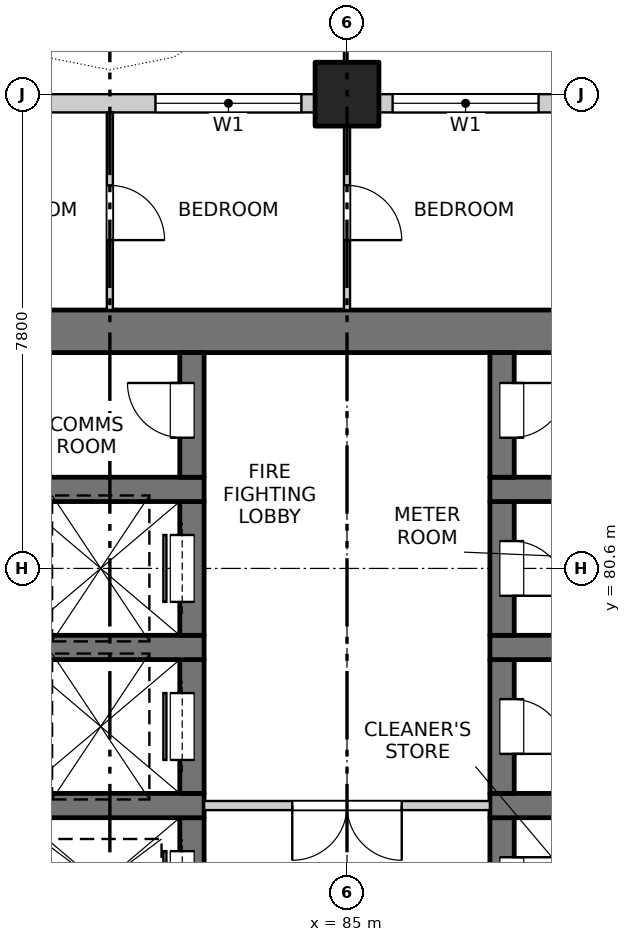
"""IFC4 building model, lengths in metres.
Left out: names, types, materials, properties, quantities, classifications, styles, units other than length and angle.
Written with IfcOpenShell. Run it as: python <this file> out.ifc"""

import sys

from ifc_helpers import new_model, si_unit, direction, frame, frame_2d, origin, origin_2d, place, context, subcontext, project, spatial, rectangle, extrude, element, fill, save


model = new_model("IFC4")
c1 = context("Model", 3, precision=1e-05, world=origin(), true_north=direction((0.0, 1.0)))
c2 = subcontext(c1, "Body", "Model", "MODEL_VIEW")
j1 = project(units=[si_unit("LENGTHUNIT", "METRE"), si_unit("PLANEANGLEUNIT", "RADIAN")], contexts=[c1])
p1 = place(None, origin())
s1 = spatial("IfcSite", under=j1, at=p1, CompositionType="ELEMENT")
p2 = place(p1, origin())
s2 = spatial("IfcBuilding", under=s1, at=p2, CompositionType="ELEMENT")
p3 = place(p2, frame((0.0, 0.0, 26.3)))
s3 = spatial("IfcBuildingStorey", under=s2, at=p3, CompositionType="ELEMENT", Elevation=26.3)
p4 = place(p3, frame((85.0, 88.4, -0.25), z_axis=(0.0, 0.0, 1.0), x_axis=(1.0, 0.0, 0.0)))
e1 = element("IfcColumn", 1, at=p4, inside=s3, PredefinedType="COLUMN", context=c2, shape_type="SweptSolid", body=[
    extrude(rectangle(XDim=1.05, YDim=1.05, at=origin_2d()), origin(), (0.0, 0.0, 1.0), 3.4),
])
p5 = place(p3, frame((75.6, 84.5, -0.25), z_axis=(0.0, 0.0, 1.0), x_axis=(1.0, 0.0, 0.0)))
e2 = element("IfcWall", 2, at=p5, inside=s3, PredefinedType="SOLIDWALL", context=c2, shape_type="SweptSolid", body=[
    extrude(rectangle(XDim=18.8, YDim=0.7, at=frame_2d((9.4, 0.0))), origin(), (0.0, 0.0, 1.0), 3.4),
])
p6 = place(p3, frame((82.45, 74.3, -0.25), z_axis=(0.0, 0.0, 1.0), x_axis=(0.0, 1.0, 0.0)))
e3 = element("IfcWall", 3, at=p6, inside=s3, PredefinedType="SOLIDWALL", context=c2, shape_type="SweptSolid", body=[
    extrude(rectangle(XDim=2.2, YDim=0.4, at=frame_2d((1.1, 0.0))), origin(), (0.0, 0.0, 1.0), 3.4),
])
p7 = place(p6, frame((0.55, 0.0, 0.25)))
e4 = element("IfcOpeningElement", 4, at=p7, cuts=e3, PredefinedType="OPENING", context=c2, shape_type="SweptSolid", body=[
    extrude(rectangle(XDim=1.1, YDim=2.1, at=frame_2d((0.55, 1.05))), frame((0.0, 0.21, 0.0), z_axis=(0.0, -1.0, 0.0), x_axis=(1.0, 0.0, 0.0)), (0.0, 0.0, 1.0), 0.42),
])
p8 = place(p3, frame((79.65, 76.7, -0.25), z_axis=(0.0, 0.0, 1.0), x_axis=(1.0, 0.0, 0.0)))
e5 = element("IfcWall", 5, at=p8, inside=s3, PredefinedType="SOLIDWALL", context=c2, shape_type="SweptSolid", body=[
    extrude(rectangle(XDim=3.0, YDim=0.4, at=frame_2d((1.5, 0.0))), origin(), (0.0, 0.0, 1.0), 3.4),
])
p9 = place(p3, frame((82.45, 76.9, -0.25), z_axis=(0.0, 0.0, 1.0), x_axis=(0.0, 1.0, 0.0)))
e6 = element("IfcWall", 6, at=p9, inside=s3, PredefinedType="SOLIDWALL", context=c2, shape_type="SweptSolid", body=[
    extrude(rectangle(XDim=2.2, YDim=0.4, at=frame_2d((1.1, 0.0))), origin(), (0.0, 0.0, 1.0), 3.4),
])
p10 = place(p9, frame((0.55, 0.0, 0.25)))
e7 = element("IfcOpeningElement", 7, at=p10, cuts=e6, PredefinedType="OPENING", context=c2, shape_type="SweptSolid", body=[
    extrude(rectangle(XDim=1.1, YDim=2.1, at=frame_2d((0.55, 1.05))), frame((0.0, 0.21, 0.0), z_axis=(0.0, -1.0, 0.0), x_axis=(1.0, 0.0, 0.0)), (0.0, 0.0, 1.0), 0.42),
])
p11 = place(p3, frame((79.65, 79.3, -0.25), z_axis=(0.0, 0.0, 1.0), x_axis=(1.0, 0.0, 0.0)))
e8 = element("IfcWall", 8, at=p11, inside=s3, PredefinedType="SOLIDWALL", context=c2, shape_type="SweptSolid", body=[
    extrude(rectangle(XDim=3.0, YDim=0.4, at=frame_2d((1.5, 0.0))), origin(), (0.0, 0.0, 1.0), 3.4),
])
p12 = place(p3, frame((82.45, 79.5, -0.25), z_axis=(0.0, 0.0, 1.0), x_axis=(0.0, 1.0, 0.0)))
e9 = element("IfcWall", 9, at=p12, inside=s3, PredefinedType="SOLIDWALL", context=c2, shape_type="SweptSolid", body=[
    extrude(rectangle(XDim=2.2, YDim=0.4, at=frame_2d((1.1, 0.0))), origin(), (0.0, 0.0, 1.0), 3.4),
])
p13 = place(p12, frame((0.55, 0.0, 0.25)))
e10 = element("IfcOpeningElement", 10, at=p13, cuts=e9, PredefinedType="OPENING", context=c2, shape_type="SweptSolid", body=[
    extrude(rectangle(XDim=1.1, YDim=2.1, at=frame_2d((0.55, 1.05))), frame((0.0, 0.21, 0.0), z_axis=(0.0, -1.0, 0.0), x_axis=(1.0, 0.0, 0.0)), (0.0, 0.0, 1.0), 0.42),
])
p14 = place(p3, frame((79.65, 81.9, -0.25), z_axis=(0.0, 0.0, 1.0), x_axis=(1.0, 0.0, 0.0)))
e11 = element("IfcWall", 11, at=p14, inside=s3, PredefinedType="SOLIDWALL", context=c2, shape_type="SweptSolid", body=[
    extrude(rectangle(XDim=3.0, YDim=0.4, at=frame_2d((1.5, 0.0))), origin(), (0.0, 0.0, 1.0), 3.4),
])
p15 = place(p3, frame((82.45, 82.1, -0.25), z_axis=(0.0, 0.0, 1.0), x_axis=(0.0, 1.0, 0.0)))
e12 = element("IfcWall", 12, at=p15, inside=s3, PredefinedType="SOLIDWALL", context=c2, shape_type="SweptSolid", body=[
    extrude(rectangle(XDim=2.05, YDim=0.4, at=frame_2d((1.025, 0.0))), origin(), (0.0, 0.0, 1.0), 3.4),
])
p16 = place(p15, frame((0.65, 0.0, 0.25)))
e13 = element("IfcOpeningElement", 13, at=p16, cuts=e12, PredefinedType="OPENING", context=c2, shape_type="SweptSolid", body=[
    extrude(rectangle(XDim=0.9, YDim=2.1, at=frame_2d((0.45, 1.05))), frame((0.0, 0.21, 0.0), z_axis=(0.0, -1.0, 0.0), x_axis=(1.0, 0.0, 0.0)), (0.0, 0.0, 1.0), 0.42),
])
p17 = place(p3, frame((87.55, 74.3, -0.25), z_axis=(0.0, 0.0, 1.0), x_axis=(0.0, 1.0, 0.0)))
e14 = element("IfcWall", 14, at=p17, inside=s3, PredefinedType="SOLIDWALL", context=c2, shape_type="SweptSolid", body=[
    extrude(rectangle(XDim=2.2, YDim=0.4, at=frame_2d((1.1, 0.0))), origin(), (0.0, 0.0, 1.0), 3.4),
])
p18 = place(p17, frame((0.65, 0.0, 0.25)))
e15 = element("IfcOpeningElement", 15, at=p18, cuts=e14, PredefinedType="OPENING", context=c2, shape_type="SweptSolid", body=[
    extrude(rectangle(XDim=0.9, YDim=2.1, at=frame_2d((0.45, 1.05))), frame((0.0, 0.21, 0.0), z_axis=(0.0, -1.0, 0.0), x_axis=(1.0, 0.0, 0.0)), (0.0, 0.0, 1.0), 0.42),
])
p19 = place(p3, frame((87.35, 76.7, -0.25), z_axis=(0.0, 0.0, 1.0), x_axis=(1.0, 0.0, 0.0)))
e16 = element("IfcWall", 16, at=p19, inside=s3, PredefinedType="SOLIDWALL", context=c2, shape_type="SweptSolid", body=[
    extrude(rectangle(XDim=3.0, YDim=0.4, at=frame_2d((1.5, 0.0))), origin(), (0.0, 0.0, 1.0), 3.4),
])
p20 = place(p3, frame((87.55, 76.9, -0.25), z_axis=(0.0, 0.0, 1.0), x_axis=(0.0, 1.0, 0.0)))
e17 = element("IfcWall", 17, at=p20, inside=s3, PredefinedType="SOLIDWALL", context=c2, shape_type="SweptSolid", body=[
    extrude(rectangle(XDim=2.2, YDim=0.4, at=frame_2d((1.1, 0.0))), origin(), (0.0, 0.0, 1.0), 3.4),
])
p21 = place(p20, frame((0.65, 0.0, 0.25)))
e18 = element("IfcOpeningElement", 18, at=p21, cuts=e17, PredefinedType="OPENING", context=c2, shape_type="SweptSolid", body=[
    extrude(rectangle(XDim=0.9, YDim=2.1, at=frame_2d((0.45, 1.05))), frame((0.0, 0.21, 0.0), z_axis=(0.0, -1.0, 0.0), x_axis=(1.0, 0.0, 0.0)), (0.0, 0.0, 1.0), 0.42),
])
p22 = place(p3, frame((87.35, 79.3, -0.25), z_axis=(0.0, 0.0, 1.0), x_axis=(1.0, 0.0, 0.0)))
e19 = element("IfcWall", 19, at=p22, inside=s3, PredefinedType="SOLIDWALL", context=c2, shape_type="SweptSolid", body=[
    extrude(rectangle(XDim=3.0, YDim=0.4, at=frame_2d((1.5, 0.0))), origin(), (0.0, 0.0, 1.0), 3.4),
])
p23 = place(p3, frame((87.55, 79.5, -0.25), z_axis=(0.0, 0.0, 1.0), x_axis=(0.0, 1.0, 0.0)))
e20 = element("IfcWall", 20, at=p23, inside=s3, PredefinedType="SOLIDWALL", context=c2, shape_type="SweptSolid", body=[
    extrude(rectangle(XDim=2.2, YDim=0.4, at=frame_2d((1.1, 0.0))), origin(), (0.0, 0.0, 1.0), 3.4),
])
p24 = place(p23, frame((0.65, 0.0, 0.25)))
e21 = element("IfcOpeningElement", 21, at=p24, cuts=e20, PredefinedType="OPENING", context=c2, shape_type="SweptSolid", body=[
    extrude(rectangle(XDim=0.9, YDim=2.1, at=frame_2d((0.45, 1.05))), frame((0.0, 0.21, 0.0), z_axis=(0.0, -1.0, 0.0), x_axis=(1.0, 0.0, 0.0)), (0.0, 0.0, 1.0), 0.42),
])
p25 = place(p3, frame((87.35, 81.9, -0.25), z_axis=(0.0, 0.0, 1.0), x_axis=(1.0, 0.0, 0.0)))
e22 = element("IfcWall", 22, at=p25, inside=s3, PredefinedType="SOLIDWALL", context=c2, shape_type="SweptSolid", body=[
    extrude(rectangle(XDim=3.0, YDim=0.4, at=frame_2d((1.5, 0.0))), origin(), (0.0, 0.0, 1.0), 3.4),
])
p26 = place(p3, frame((87.55, 82.1, -0.25), z_axis=(0.0, 0.0, 1.0), x_axis=(0.0, 1.0, 0.0)))
e23 = element("IfcWall", 23, at=p26, inside=s3, PredefinedType="SOLIDWALL", context=c2, shape_type="SweptSolid", body=[
    extrude(rectangle(XDim=2.05, YDim=0.4, at=frame_2d((1.025, 0.0))), origin(), (0.0, 0.0, 1.0), 3.4),
])
p27 = place(p26, frame((0.65, 0.0, 0.25)))
e24 = element("IfcOpeningElement", 24, at=p27, cuts=e23, PredefinedType="OPENING", context=c2, shape_type="SweptSolid", body=[
    extrude(rectangle(XDim=0.9, YDim=2.1, at=frame_2d((0.45, 1.05))), frame((0.0, 0.21, 0.0), z_axis=(0.0, -1.0, 0.0), x_axis=(1.0, 0.0, 0.0)), (0.0, 0.0, 1.0), 0.42),
])
p28 = place(p3, frame((77.725, 88.25, 0.0), z_axis=(0.0, 0.0, 1.0), x_axis=(1.0, 0.0, 0.0)))
e25 = element("IfcWall", 25, at=p28, inside=s3, PredefinedType="SOLIDWALL", context=c2, shape_type="SweptSolid", body=[
    extrude(rectangle(XDim=6.75, YDim=0.3, at=frame_2d((3.375, 0.0))), origin(), (0.0, 0.0, 1.0), 2.7),
])
p29 = place(p28, frame((0.525, 0.0, 0.0)))
e26 = element("IfcOpeningElement", 26, at=p29, cuts=e25, PredefinedType="OPENING", context=c2, shape_type="SweptSolid", body=[
    extrude(rectangle(XDim=1.8, YDim=2.4, at=frame_2d((0.9, 1.2))), frame((0.0, 0.16, 0.0), z_axis=(0.0, -1.0, 0.0), x_axis=(1.0, 0.0, 0.0)), (0.0, 0.0, 1.0), 0.32),
])
p30 = place(p28, frame((4.125, 0.0, 0.9)))
e27 = element("IfcOpeningElement", 27, at=p30, cuts=e25, PredefinedType="OPENING", context=c2, shape_type="SweptSolid", body=[
    extrude(rectangle(XDim=2.4, YDim=1.8, at=frame_2d((1.2, 0.9))), frame((0.0, 0.16, 0.0), z_axis=(0.0, -1.0, 0.0), x_axis=(1.0, 0.0, 0.0)), (0.0, 0.0, 1.0), 0.32),
])
p31 = place(p3, frame((85.525, 88.25, 0.0), z_axis=(0.0, 0.0, 1.0), x_axis=(1.0, 0.0, 0.0)))
e28 = element("IfcWall", 28, at=p31, inside=s3, PredefinedType="SOLIDWALL", context=c2, shape_type="SweptSolid", body=[
    extrude(rectangle(XDim=6.75, YDim=0.3, at=frame_2d((3.375, 0.0))), origin(), (0.0, 0.0, 1.0), 2.7),
])
p32 = place(p31, frame((0.225, 0.0, 0.9)))
e29 = element("IfcOpeningElement", 29, at=p32, cuts=e28, PredefinedType="OPENING", context=c2, shape_type="SweptSolid", body=[
    extrude(rectangle(XDim=2.4, YDim=1.8, at=frame_2d((1.2, 0.9))), frame((0.0, 0.16, 0.0), z_axis=(0.0, -1.0, 0.0), x_axis=(1.0, 0.0, 0.0)), (0.0, 0.0, 1.0), 0.32),
])
p33 = place(p31, frame((4.125, 0.0, 0.9)))
e30 = element("IfcOpeningElement", 30, at=p33, cuts=e28, PredefinedType="OPENING", context=c2, shape_type="SweptSolid", body=[
    extrude(rectangle(XDim=2.4, YDim=1.8, at=frame_2d((1.2, 0.9))), frame((0.0, 0.16, 0.0), z_axis=(0.0, -1.0, 0.0), x_axis=(1.0, 0.0, 0.0)), (0.0, 0.0, 1.0), 0.32),
])
p34 = place(p3, frame((82.65, 76.7, 0.0), z_axis=(0.0, 0.0, 1.0), x_axis=(1.0, 0.0, 0.0)))
e31 = element("IfcWall", 31, at=p34, inside=s3, PredefinedType="PARTITIONING", context=c2, shape_type="SweptSolid", body=[
    extrude(rectangle(XDim=4.7, YDim=0.15, at=frame_2d((2.35, 0.0))), origin(), (0.0, 0.0, 1.0), 3.15),
])
p35 = place(p34, frame((1.45, 0.0, 0.0)))
e32 = element("IfcOpeningElement", 32, at=p35, cuts=e31, PredefinedType="OPENING", context=c2, shape_type="SweptSolid", body=[
    extrude(rectangle(XDim=1.8, YDim=2.1, at=frame_2d((0.9, 1.05))), frame((0.0, 0.085, 0.0), z_axis=(0.0, -1.0, 0.0), x_axis=(1.0, 0.0, 0.0)), (0.0, 0.0, 1.0), 0.17),
])
p36 = place(p3, frame((81.1, 84.85, 0.0), z_axis=(0.0, 0.0, 1.0), x_axis=(0.0, 1.0, 0.0)))
e33 = element("IfcWall", 33, at=p36, inside=s3, PredefinedType="PARTITIONING", context=c2, shape_type="SweptSolid", body=[
    extrude(rectangle(XDim=3.25, YDim=0.1, at=frame_2d((1.625, 0.0))), origin(), (0.0, 0.0, 1.0), 3.15),
])
p37 = place(p36, frame((1.15, 0.0, 0.0)))
e34 = element("IfcOpeningElement", 34, at=p37, cuts=e33, PredefinedType="OPENING", context=c2, shape_type="SweptSolid", body=[
    extrude(rectangle(XDim=0.9, YDim=2.1, at=frame_2d((0.45, 1.05))), frame((0.0, 0.06, 0.0), z_axis=(0.0, -1.0, 0.0), x_axis=(1.0, 0.0, 0.0)), (0.0, 0.0, 1.0), 0.12),
])
p38 = place(p3, frame((85.0, 84.85, 0.0), z_axis=(0.0, 0.0, 1.0), x_axis=(0.0, 1.0, 0.0)))
e35 = element("IfcWall", 35, at=p38, inside=s3, PredefinedType="PARTITIONING", context=c2, shape_type="SweptSolid", body=[
    extrude(rectangle(XDim=3.25, YDim=0.1, at=frame_2d((1.625, 0.0))), origin(), (0.0, 0.0, 1.0), 3.15),
])
p39 = place(p38, frame((1.15, 0.0, 0.0)))
e36 = element("IfcOpeningElement", 36, at=p39, cuts=e35, PredefinedType="OPENING", context=c2, shape_type="SweptSolid", body=[
    extrude(rectangle(XDim=0.9, YDim=2.1, at=frame_2d((0.45, 1.05))), frame((0.0, 0.06, 0.0), z_axis=(0.0, -1.0, 0.0), x_axis=(1.0, 0.0, 0.0)), (0.0, 0.0, 1.0), 0.12),
])
p40 = place(p30, origin())
e37 = element("IfcWindow", 37, at=p40, inside=s3, PartitioningType="DOUBLE_PANEL_VERTICAL", PredefinedType="WINDOW", context=c2, shape_type="SweptSolid", body=[
    extrude(rectangle(XDim=2.4, YDim=1.8, at=frame_2d((1.2, 0.9))), frame((0.0, 0.03, 0.0), z_axis=(0.0, -1.0, 0.0), x_axis=(1.0, 0.0, 0.0)), (0.0, 0.0, 1.0), 0.06),
])
fill(e27, e37)
p41 = place(p32, origin())
e38 = element("IfcWindow", 38, at=p41, inside=s3, PartitioningType="DOUBLE_PANEL_VERTICAL", PredefinedType="WINDOW", context=c2, shape_type="SweptSolid", body=[
    extrude(rectangle(XDim=2.4, YDim=1.8, at=frame_2d((1.2, 0.9))), frame((0.0, 0.03, 0.0), z_axis=(0.0, -1.0, 0.0), x_axis=(1.0, 0.0, 0.0)), (0.0, 0.0, 1.0), 0.06),
])
fill(e29, e38)
p42 = place(p7, origin())
e39 = element("IfcDoor", 39, at=p42, inside=s3, OperationType="SLIDING_TO_LEFT", PredefinedType="DOOR", context=c2, shape_type="SweptSolid", body=[
    extrude(rectangle(XDim=1.1, YDim=2.1, at=frame_2d((0.55, 1.05))), frame((0.0, 0.185, 0.0), z_axis=(0.0, -1.0, 0.0), x_axis=(1.0, 0.0, 0.0)), (0.0, 0.0, 1.0), 0.05),
])
fill(e4, e39)
p43 = place(p18, origin())
e40 = element("IfcDoor", 40, at=p43, inside=s3, OperationType="SINGLE_SWING_LEFT", PredefinedType="DOOR", context=c2, shape_type="SweptSolid", body=[
    extrude(rectangle(XDim=0.9, YDim=2.1, at=frame_2d((0.45, 1.05))), frame((0.0, -0.135, 0.0), z_axis=(0.0, -1.0, 0.0), x_axis=(1.0, 0.0, 0.0)), (0.0, 0.0, 1.0), 0.05),
])
fill(e15, e40)
p44 = place(p35, origin())
e41 = element("IfcDoor", 41, at=p44, inside=s3, OperationType="DOUBLE_DOOR_SINGLE_SWING", PredefinedType="DOOR", context=c2, shape_type="SweptSolid", body=[
    extrude(rectangle(XDim=1.8, YDim=2.1, at=frame_2d((0.9, 1.05))), frame((0.0, 0.025, 0.0), z_axis=(0.0, -1.0, 0.0), x_axis=(1.0, 0.0, 0.0)), (0.0, 0.0, 1.0), 0.05),
])
fill(e32, e41)
p45 = place(p10, origin())
e42 = element("IfcDoor", 42, at=p45, inside=s3, OperationType="SLIDING_TO_LEFT", PredefinedType="DOOR", context=c2, shape_type="SweptSolid", body=[
    extrude(rectangle(XDim=1.1, YDim=2.1, at=frame_2d((0.55, 1.05))), frame((0.0, 0.185, 0.0), z_axis=(0.0, -1.0, 0.0), x_axis=(1.0, 0.0, 0.0)), (0.0, 0.0, 1.0), 0.05),
])
fill(e7, e42)
p46 = place(p21, origin())
e43 = element("IfcDoor", 43, at=p46, inside=s3, OperationType="SINGLE_SWING_RIGHT", PredefinedType="DOOR", context=c2, shape_type="SweptSolid", body=[
    extrude(rectangle(XDim=0.9, YDim=2.1, at=frame_2d((0.45, 1.05))), frame((0.0, -0.135, 0.0), z_axis=(0.0, -1.0, 0.0), x_axis=(1.0, 0.0, 0.0)), (0.0, 0.0, 1.0), 0.05),
])
fill(e18, e43)
p47 = place(p13, origin())
e44 = element("IfcDoor", 44, at=p47, inside=s3, OperationType="SLIDING_TO_LEFT", PredefinedType="DOOR", context=c2, shape_type="SweptSolid", body=[
    extrude(rectangle(XDim=1.1, YDim=2.1, at=frame_2d((0.55, 1.05))), frame((0.0, 0.185, 0.0), z_axis=(0.0, -1.0, 0.0), x_axis=(1.0, 0.0, 0.0)), (0.0, 0.0, 1.0), 0.05),
])
fill(e10, e44)
p48 = place(p24, origin())
e45 = element("IfcDoor", 45, at=p48, inside=s3, OperationType="SINGLE_SWING_RIGHT", PredefinedType="DOOR", context=c2, shape_type="SweptSolid", body=[
    extrude(rectangle(XDim=0.9, YDim=2.1, at=frame_2d((0.45, 1.05))), frame((0.0, -0.135, 0.0), z_axis=(0.0, -1.0, 0.0), x_axis=(1.0, 0.0, 0.0)), (0.0, 0.0, 1.0), 0.05),
])
fill(e21, e45)
p49 = place(p16, origin())
e46 = element("IfcDoor", 46, at=p49, inside=s3, OperationType="SINGLE_SWING_RIGHT", PredefinedType="DOOR", context=c2, shape_type="SweptSolid", body=[
    extrude(rectangle(XDim=0.9, YDim=2.1, at=frame_2d((0.45, 1.05))), frame((0.0, 0.185, 0.0), z_axis=(0.0, -1.0, 0.0), x_axis=(1.0, 0.0, 0.0)), (0.0, 0.0, 1.0), 0.05),
])
fill(e13, e46)
p50 = place(p27, origin())
e47 = element("IfcDoor", 47, at=p50, inside=s3, OperationType="SINGLE_SWING_LEFT", PredefinedType="DOOR", context=c2, shape_type="SweptSolid", body=[
    extrude(rectangle(XDim=0.9, YDim=2.1, at=frame_2d((0.45, 1.05))), frame((0.0, -0.135, 0.0), z_axis=(0.0, -1.0, 0.0), x_axis=(1.0, 0.0, 0.0)), (0.0, 0.0, 1.0), 0.05),
])
fill(e24, e47)
p51 = place(p37, origin())
e48 = element("IfcDoor", 48, at=p51, inside=s3, OperationType="SINGLE_SWING_RIGHT", PredefinedType="DOOR", context=c2, shape_type="SweptSolid", body=[
    extrude(rectangle(XDim=0.9, YDim=2.1, at=frame_2d((0.45, 1.05))), frame((0.0, 0.025, 0.0), z_axis=(0.0, -1.0, 0.0), x_axis=(1.0, 0.0, 0.0)), (0.0, 0.0, 1.0), 0.05),
])
fill(e34, e48)
p52 = place(p39, origin())
e49 = element("IfcDoor", 49, at=p52, inside=s3, OperationType="SINGLE_SWING_RIGHT", PredefinedType="DOOR", context=c2, shape_type="SweptSolid", body=[
    extrude(rectangle(XDim=0.9, YDim=2.1, at=frame_2d((0.45, 1.05))), frame((0.0, 0.025, 0.0), z_axis=(0.0, -1.0, 0.0), x_axis=(1.0, 0.0, 0.0)), (0.0, 0.0, 1.0), 0.05),
])
fill(e36, e49)
save(model, sys.argv[1])
